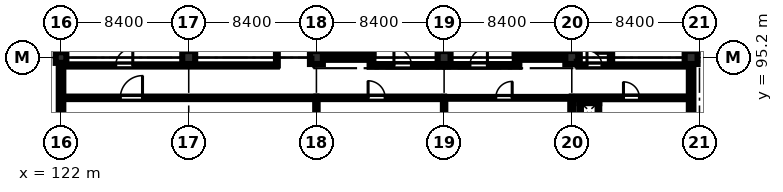
"""IFC4 building model, lengths in metres.
Left out: names, types, materials, properties, quantities, classifications, styles, units other than length and angle.
Written with IfcOpenShell. Run it as: python <this file> out.ifc"""

import sys

from ifc_helpers import new_model, si_unit, direction, frame, frame_2d, origin, origin_2d, place, context, subcontext, project, spatial, rectangle, extrude, element, fill, save


model = new_model("IFC4")
c1 = context("Model", 3, precision=1e-05, world=origin(), true_north=direction((0.0, 1.0)))
c2 = subcontext(c1, "Body", "Model", "MODEL_VIEW")
j1 = project(units=[si_unit("LENGTHUNIT", "METRE"), si_unit("PLANEANGLEUNIT", "RADIAN")], contexts=[c1])
p1 = place(None, origin())
s1 = spatial("IfcSite", under=j1, at=p1, CompositionType="ELEMENT")
p2 = place(p1, origin())
s2 = spatial("IfcBuilding", under=s1, at=p2, CompositionType="ELEMENT")
p3 = place(p2, frame((0.0, 0.0, 23.4)))
s3 = spatial("IfcBuildingStorey", under=s2, at=p3, CompositionType="ELEMENT", Elevation=23.4)
p4 = place(p3, frame((122.0, 95.2, 0.0), z_axis=(0.0, 0.0, 1.0), x_axis=(1.0, 0.0, 0.0)))
e1 = element("IfcColumn", 1, at=p4, inside=s3, PredefinedType="COLUMN", context=c2, shape_type="SweptSolid", body=[
    extrude(rectangle(XDim=0.7, YDim=0.7, at=origin_2d()), origin(), (0.0, 0.0, 1.0), 4.0),
])
for number, where, z_axis, x_axis in (
    (2, (130.4, 95.2, 0.0), (0.0, 0.0, 1.0), (1.0, 0.0, 0.0)),
    (3, (138.8, 95.2, 0.0), (0.0, 0.0, 1.0), (1.0, 0.0, 0.0)),
    (4, (147.2, 95.2, 0.0), (0.0, 0.0, 1.0), (1.0, 0.0, 0.0)),
    (5, (155.6, 95.2, 0.0), (0.0, 0.0, 1.0), (1.0, 0.0, 0.0)),
    (6, (163.45, 95.2, 0.0), (0.0, 0.0, 1.0), (1.0, 0.0, 0.0)),
):
    element("IfcColumn", number, at=place(p3, frame(where, z_axis=z_axis, x_axis=x_axis)), inside=s3, PredefinedType="COLUMN", context=c2, shape_type="SweptSolid", body=[
        extrude(rectangle(XDim=0.85, YDim=0.85, at=origin_2d()), origin(), (0.0, 0.0, 1.0), 4.0),
    ])
p5 = place(p3, frame((138.65, 95.25, 0.0), z_axis=(0.0, 0.0, 1.0), x_axis=(1.0, 0.0, 0.0)))
e7 = element("IfcWall", 7, at=p5, inside=s3, PredefinedType="SHEAR", context=c2, shape_type="SweptSolid", body=[
    extrude(rectangle(XDim=3.9, YDim=0.4, at=frame_2d((1.95, 0.0))), origin(), (0.0, 0.0, 1.0), 4.0),
])
p6 = place(p3, frame((138.85, 95.45, 0.0), z_axis=(0.0, 0.0, 1.0), x_axis=(0.0, 1.0, 0.0)))
e8 = element("IfcWall", 8, at=p6, inside=s3, PredefinedType="SHEAR", context=c2, shape_type="SweptSolid", body=[
    extrude(rectangle(XDim=7.9, YDim=0.4, at=frame_2d((3.95, 0.0))), origin(), (0.0, 0.0, 1.0), 4.0),
])
p7 = place(p3, frame((142.35, 95.45, 0.0), z_axis=(0.0, 0.0, 1.0), x_axis=(0.0, 1.0, 0.0)))
e9 = element("IfcWall", 9, at=p7, inside=s3, PredefinedType="SHEAR", context=c2, shape_type="SweptSolid", body=[
    extrude(rectangle(XDim=7.9, YDim=0.4, at=frame_2d((3.95, 0.0))), origin(), (0.0, 0.0, 1.0), 4.0),
])
p8 = place(p7, frame((0.22, 0.0, 0.0)))
e10 = element("IfcOpeningElement", 10, at=p8, cuts=e9, PredefinedType="OPENING", context=c2, shape_type="SweptSolid", body=[
    extrude(rectangle(XDim=1.15, YDim=2.15, at=frame_2d((0.575, 1.075))), frame((0.0, 0.21, 0.0), z_axis=(0.0, -1.0, 0.0), x_axis=(1.0, 0.0, 0.0)), (0.0, 0.0, 1.0), 0.42),
])
p9 = place(p3, frame((151.85, 95.25, 0.0), z_axis=(0.0, 0.0, 1.0), x_axis=(1.0, 0.0, 0.0)))
e11 = element("IfcWall", 11, at=p9, inside=s3, PredefinedType="SHEAR", context=c2, shape_type="SweptSolid", body=[
    extrude(rectangle(XDim=3.9, YDim=0.4, at=frame_2d((1.95, 0.0))), origin(), (0.0, 0.0, 1.0), 4.0),
])
p10 = place(p3, frame((152.05, 95.45, 0.0), z_axis=(0.0, 0.0, 1.0), x_axis=(0.0, 1.0, 0.0)))
e12 = element("IfcWall", 12, at=p10, inside=s3, PredefinedType="SHEAR", context=c2, shape_type="SweptSolid", body=[
    extrude(rectangle(XDim=7.9, YDim=0.4, at=frame_2d((3.95, 0.0))), origin(), (0.0, 0.0, 1.0), 4.0),
])
p11 = place(p10, frame((0.35, 0.0, 0.0)))
e13 = element("IfcOpeningElement", 13, at=p11, cuts=e12, PredefinedType="OPENING", context=c2, shape_type="SweptSolid", body=[
    extrude(rectangle(XDim=1.15, YDim=2.15, at=frame_2d((0.575, 1.075))), frame((0.0, 0.21, 0.0), z_axis=(0.0, -1.0, 0.0), x_axis=(1.0, 0.0, 0.0)), (0.0, 0.0, 1.0), 0.42),
])
p12 = place(p3, frame((155.55, 95.45, 0.0), z_axis=(0.0, 0.0, 1.0), x_axis=(0.0, 1.0, 0.0)))
e14 = element("IfcWall", 14, at=p12, inside=s3, PredefinedType="SHEAR", context=c2, shape_type="SweptSolid", body=[
    extrude(rectangle(XDim=7.9, YDim=0.4, at=frame_2d((3.95, 0.0))), origin(), (0.0, 0.0, 1.0), 4.0),
])
p13 = place(p3, frame((163.45, 94.775, 0.0), z_axis=(0.0, 0.0, 1.0), x_axis=(0.0, -1.0, 0.0)))
e15 = element("IfcWall", 15, at=p13, inside=s3, PredefinedType="STANDARD", context=c2, shape_type="SweptSolid", body=[
    extrude(rectangle(XDim=7.55, YDim=0.3, at=frame_2d((3.775, 0.0))), origin(), (0.0, 0.0, 1.0), 3.3),
])
p14 = place(p13, frame((4.2, 0.0, 1.1)))
e16 = element("IfcOpeningElement", 16, at=p14, cuts=e15, PredefinedType="OPENING", context=c2, shape_type="SweptSolid", body=[
    extrude(rectangle(XDim=1.55, YDim=1.75, at=frame_2d((0.775, 0.875))), frame((0.0, 0.16, 0.0), z_axis=(0.0, -1.0, 0.0), x_axis=(1.0, 0.0, 0.0)), (0.0, 0.0, 1.0), 0.32),
])
p15 = place(p3, frame((122.0, 87.15, 0.0), z_axis=(0.0, 0.0, 1.0), x_axis=(0.0, 1.0, 0.0)))
e17 = element("IfcWall", 17, at=p15, inside=s3, PredefinedType="STANDARD", context=c2, shape_type="SweptSolid", body=[
    extrude(rectangle(XDim=7.7, YDim=0.3, at=frame_2d((3.85, 0.0))), origin(), (0.0, 0.0, 1.0), 3.3),
])
p16 = place(p15, frame((2.4, 0.0, 0.95)))
e18 = element("IfcOpeningElement", 18, at=p16, cuts=e17, PredefinedType="OPENING", context=c2, shape_type="SweptSolid", body=[
    extrude(rectangle(XDim=1.5, YDim=1.8, at=frame_2d((0.75, 0.9))), frame((0.0, 0.16, 0.0), z_axis=(0.0, -1.0, 0.0), x_axis=(1.0, 0.0, 0.0)), (0.0, 0.0, 1.0), 0.32),
])
p17 = place(p3, frame((122.0, 95.55, 0.0), z_axis=(0.0, 0.0, 1.0), x_axis=(0.0, 1.0, 0.0)))
e19 = element("IfcWall", 19, at=p17, inside=s3, PredefinedType="STANDARD", context=c2, shape_type="SweptSolid", body=[
    extrude(rectangle(XDim=7.7, YDim=0.3, at=frame_2d((3.85, 0.0))), origin(), (0.0, 0.0, 1.0), 3.3),
])
p18 = place(p17, frame((2.4, 0.0, 1.0)))
e20 = element("IfcOpeningElement", 20, at=p18, cuts=e19, PredefinedType="OPENING", context=c2, shape_type="SweptSolid", body=[
    extrude(rectangle(XDim=1.8, YDim=1.8, at=frame_2d((0.9, 0.9))), frame((0.0, 0.16, 0.0), z_axis=(0.0, -1.0, 0.0), x_axis=(1.0, 0.0, 0.0)), (0.0, 0.0, 1.0), 0.32),
])
p19 = place(p3, frame((142.3, 94.68, 0.0), z_axis=(0.0, 0.0, 1.0), x_axis=(1.0, 0.0, 0.0)))
e21 = element("IfcWall", 21, at=p19, inside=s3, PredefinedType="STANDARD", context=c2, shape_type="SweptSolid", body=[
    extrude(rectangle(XDim=4.8, YDim=0.18, at=frame_2d((2.4, 0.0))), origin(), (0.0, 0.0, 1.0), 4.0),
])
p20 = place(p19, frame((1.6, 0.0, 0.0)))
e22 = element("IfcOpeningElement", 22, at=p20, cuts=e21, PredefinedType="OPENING", context=c2, shape_type="SweptSolid", body=[
    extrude(rectangle(XDim=1.15, YDim=2.15, at=frame_2d((0.575, 1.075))), frame((0.0, 0.1, 0.0), z_axis=(0.0, -1.0, 0.0), x_axis=(1.0, 0.0, 0.0)), (0.0, 0.0, 1.0), 0.2),
])
p21 = place(p3, frame((147.3, 94.68, 0.0), z_axis=(0.0, 0.0, 1.0), x_axis=(1.0, 0.0, 0.0)))
e23 = element("IfcWall", 23, at=p21, inside=s3, PredefinedType="STANDARD", context=c2, shape_type="SweptSolid", body=[
    extrude(rectangle(XDim=4.85, YDim=0.18, at=frame_2d((2.425, 0.0))), origin(), (0.0, 0.0, 1.0), 4.0),
])
p22 = place(p21, frame((1.6, 0.0, 0.0)))
e24 = element("IfcOpeningElement", 24, at=p22, cuts=e23, PredefinedType="OPENING", context=c2, shape_type="SweptSolid", body=[
    extrude(rectangle(XDim=1.15, YDim=2.15, at=frame_2d((0.575, 1.075))), frame((0.0, 0.1, 0.0), z_axis=(0.0, -1.0, 0.0), x_axis=(1.0, 0.0, 0.0)), (0.0, 0.0, 1.0), 0.2),
])
p23 = place(p3, frame((156.05, 94.68, 0.0), z_axis=(0.0, 0.0, 1.0), x_axis=(1.0, 0.0, 0.0)))
e25 = element("IfcWall", 25, at=p23, inside=s3, PredefinedType="PARTITIONING", context=c2, shape_type="SweptSolid", body=[
    extrude(rectangle(XDim=7.15, YDim=0.15, at=frame_2d((3.575, 0.0))), origin(), (0.0, 0.0, 1.0), 4.0),
])
p24 = place(p23, frame((0.55, 0.0, 0.0)))
e26 = element("IfcOpeningElement", 26, at=p24, cuts=e25, PredefinedType="OPENING", context=c2, shape_type="SweptSolid", body=[
    extrude(rectangle(XDim=0.98, YDim=2.12, at=frame_2d((0.49, 1.06))), frame((0.0, 0.085, 0.0), z_axis=(0.0, -1.0, 0.0), x_axis=(1.0, 0.0, 0.0)), (0.0, 0.0, 1.0), 0.17),
])
p25 = place(p3, frame((158.18, 94.68, 0.0), z_axis=(0.0, 0.0, 1.0), x_axis=(0.0, 1.0, 0.0)))
e27 = element("IfcWall", 27, at=p25, inside=s3, PredefinedType="PARTITIONING", context=c2, shape_type="SweptSolid", body=[
    extrude(rectangle(XDim=8.57, YDim=0.15, at=frame_2d((4.285, 0.0))), origin(), (0.0, 0.0, 1.0), 4.0),
])
p26 = place(p25, frame((0.8, 0.0, 0.0)))
e28 = element("IfcOpeningElement", 28, at=p26, cuts=e27, PredefinedType="OPENING", context=c2, shape_type="SweptSolid", body=[
    extrude(rectangle(XDim=1.0, YDim=2.12, at=frame_2d((0.5, 1.06))), frame((0.0, 0.085, 0.0), z_axis=(0.0, -1.0, 0.0), x_axis=(1.0, 0.0, 0.0)), (0.0, 0.0, 1.0), 0.17),
])
p27 = place(p25, frame((3.5, 0.0, 0.0)))
e29 = element("IfcOpeningElement", 29, at=p27, cuts=e27, PredefinedType="OPENING", context=c2, shape_type="SweptSolid", body=[
    extrude(rectangle(XDim=0.92, YDim=2.1, at=frame_2d((0.46, 1.05))), frame((0.0, 0.085, 0.0), z_axis=(0.0, -1.0, 0.0), x_axis=(1.0, 0.0, 0.0)), (0.0, 0.0, 1.0), 0.17),
])
p28 = place(p25, frame((6.4, 0.0, 0.0)))
e30 = element("IfcOpeningElement", 30, at=p28, cuts=e27, PredefinedType="OPENING", context=c2, shape_type="SweptSolid", body=[
    extrude(rectangle(XDim=0.92, YDim=2.1, at=frame_2d((0.46, 1.05))), frame((0.0, 0.085, 0.0), z_axis=(0.0, -1.0, 0.0), x_axis=(1.0, 0.0, 0.0)), (0.0, 0.0, 1.0), 0.17),
])
p29 = place(p3, frame((156.05, 94.68, 0.0), z_axis=(0.0, 0.0, 1.0), x_axis=(0.0, 1.0, 0.0)))
e31 = element("IfcWall", 31, at=p29, inside=s3, PredefinedType="PARTITIONING", context=c2, shape_type="SweptSolid", body=[
    extrude(rectangle(XDim=8.57, YDim=0.15, at=frame_2d((4.285, 0.0))), origin(), (0.0, 0.0, 1.0), 4.0),
])
p30 = place(p3, frame((136.2, 94.68, 0.0), z_axis=(0.0, 0.0, 1.0), x_axis=(0.0, 1.0, 0.0)))
e32 = element("IfcWall", 32, at=p30, inside=s3, PredefinedType="PARTITIONING", context=c2, shape_type="SweptSolid", body=[
    extrude(rectangle(XDim=9.07, YDim=0.12, at=frame_2d((4.535, 0.0))), origin(), (0.0, 0.0, 1.0), 4.0),
])
p31 = place(p3, frame((122.4, 94.68, 0.0), z_axis=(0.0, 0.0, 1.0), x_axis=(1.0, 0.0, 0.0)))
e33 = element("IfcWall", 33, at=p31, inside=s3, PredefinedType="PARTITIONING", context=c2, shape_type="SweptSolid", body=[
    extrude(rectangle(XDim=13.8, YDim=0.145, at=frame_2d((6.9, 0.0))), origin(), (0.0, 0.0, 1.0), 4.0),
])
p32 = place(p31, frame((3.2, 0.0, 0.0)))
e34 = element("IfcOpeningElement", 34, at=p32, cuts=e33, PredefinedType="OPENING", context=c2, shape_type="SweptSolid", body=[
    extrude(rectangle(XDim=1.12, YDim=2.18, at=frame_2d((0.56, 1.09))), frame((0.0, 0.083, 0.0), z_axis=(0.0, -1.0, 0.0), x_axis=(1.0, 0.0, 0.0)), (0.0, 0.0, 1.0), 0.165),
])
p33 = place(p3, frame((122.15, 92.55, 0.0), z_axis=(0.0, 0.0, 1.0), x_axis=(1.0, 0.0, 0.0)))
e35 = element("IfcWall", 35, at=p33, inside=s3, PredefinedType="PARTITIONING", context=c2, shape_type="SweptSolid", body=[
    extrude(rectangle(XDim=16.65, YDim=0.165, at=frame_2d((8.325, 0.0))), origin(), (0.0, 0.0, 1.0), 4.0),
])
p34 = place(p33, frame((3.75, 0.0, 0.0)))
e36 = element("IfcOpeningElement", 36, at=p34, cuts=e35, PredefinedType="OPENING", context=c2, shape_type="SweptSolid", body=[
    extrude(rectangle(XDim=1.46, YDim=2.22, at=frame_2d((0.73, 1.11))), frame((0.0, 0.093, 0.0), z_axis=(0.0, -1.0, 0.0), x_axis=(1.0, 0.0, 0.0)), (0.0, 0.0, 1.0), 0.185),
])
p35 = place(p3, frame((138.8, 92.55, 0.0), z_axis=(0.0, 0.0, 1.0), x_axis=(1.0, 0.0, 0.0)))
e37 = element("IfcWall", 37, at=p35, inside=s3, PredefinedType="PARTITIONING", context=c2, shape_type="SweptSolid", body=[
    extrude(rectangle(XDim=8.4, YDim=0.165, at=frame_2d((4.2, 0.0))), origin(), (0.0, 0.0, 1.0), 4.0),
])
p36 = place(p35, frame((3.4, 0.0, 0.0)))
e38 = element("IfcOpeningElement", 38, at=p36, cuts=e37, PredefinedType="OPENING", context=c2, shape_type="SweptSolid", body=[
    extrude(rectangle(XDim=1.12, YDim=2.18, at=frame_2d((0.56, 1.09))), frame((0.0, 0.093, 0.0), z_axis=(0.0, -1.0, 0.0), x_axis=(1.0, 0.0, 0.0)), (0.0, 0.0, 1.0), 0.185),
])
p37 = place(p3, frame((138.8, 78.55, 0.0), z_axis=(0.0, 0.0, 1.0), x_axis=(0.0, 1.0, 0.0)))
e39 = element("IfcWall", 39, at=p37, inside=s3, PredefinedType="PARTITIONING", context=c2, shape_type="SweptSolid", body=[
    extrude(rectangle(XDim=14.0, YDim=0.158, at=frame_2d((7.0, 0.0))), origin(), (0.0, 0.0, 1.0), 3.3),
])
p38 = place(p3, frame((147.2, 92.55, 0.0), z_axis=(0.0, 0.0, 1.0), x_axis=(1.0, 0.0, 0.0)))
e40 = element("IfcWall", 40, at=p38, inside=s3, PredefinedType="PARTITIONING", context=c2, shape_type="SweptSolid", body=[
    extrude(rectangle(XDim=8.4, YDim=0.12, at=frame_2d((4.2, 0.0))), origin(), (0.0, 0.0, 1.0), 4.0),
])
p39 = place(p38, frame((3.4, 0.0, 0.0)))
e41 = element("IfcOpeningElement", 41, at=p39, cuts=e40, PredefinedType="OPENING", context=c2, shape_type="SweptSolid", body=[
    extrude(rectangle(XDim=1.08, YDim=2.15, at=frame_2d((0.54, 1.075))), frame((0.0, 0.07, 0.0), z_axis=(0.0, -1.0, 0.0), x_axis=(1.0, 0.0, 0.0)), (0.0, 0.0, 1.0), 0.14),
])
p40 = place(p3, frame((147.2, 78.55, 0.0), z_axis=(0.0, 0.0, 1.0), x_axis=(0.0, 1.0, 0.0)))
e42 = element("IfcWall", 42, at=p40, inside=s3, PredefinedType="PARTITIONING", context=c2, shape_type="SweptSolid", body=[
    extrude(rectangle(XDim=14.0, YDim=0.158, at=frame_2d((7.0, 0.0))), origin(), (0.0, 0.0, 1.0), 3.3),
])
p41 = place(p3, frame((155.6, 92.55, 0.0), z_axis=(0.0, 0.0, 1.0), x_axis=(1.0, 0.0, 0.0)))
e43 = element("IfcWall", 43, at=p41, inside=s3, PredefinedType="STANDARD", context=c2, shape_type="SweptSolid", body=[
    extrude(rectangle(XDim=7.75, YDim=0.18, at=frame_2d((3.875, 0.0))), origin(), (0.0, 0.0, 1.0), 4.0),
])
p42 = place(p41, frame((3.4, 0.0, 0.0)))
e44 = element("IfcOpeningElement", 44, at=p42, cuts=e43, PredefinedType="OPENING", context=c2, shape_type="SweptSolid", body=[
    extrude(rectangle(XDim=1.05, YDim=2.15, at=frame_2d((0.525, 1.075))), frame((0.0, 0.1, 0.0), z_axis=(0.0, -1.0, 0.0), x_axis=(1.0, 0.0, 0.0)), (0.0, 0.0, 1.0), 0.2),
])
p43 = place(p3, frame((155.6, 78.55, 0.0), z_axis=(0.0, 0.0, 1.0), x_axis=(0.0, 1.0, 0.0)))
e45 = element("IfcWall", 45, at=p43, inside=s3, PredefinedType="SOLIDWALL", context=c2, shape_type="SweptSolid", body=[
    extrude(rectangle(XDim=14.0, YDim=0.2, at=frame_2d((7.0, 0.0))), origin(), (0.0, 0.0, 1.0), 3.3),
])
p44 = place(p3, frame((156.095, 92.252, 0.0), z_axis=(0.0, 0.0, 1.0), x_axis=(1.0, 0.0, 0.0)))
e46 = element("IfcWall", 46, at=p44, inside=s3, PredefinedType="PARTITIONING", context=c2, shape_type="SweptSolid", body=[
    extrude(rectangle(XDim=1.31, YDim=0.105, at=frame_2d((0.655, 0.0))), origin(), (0.0, 0.0, 1.0), 4.0),
])
for number, where, z_axis, x_axis in (
    (47, (156.147, 91.2, 0.0), (0.0, 0.0, 1.0), (0.0, 1.0, 0.0)),
    (48, (157.353, 91.2, 0.0), (0.0, 0.0, 1.0), (0.0, 1.0, 0.0)),
):
    element("IfcWall", number, at=place(p3, frame(where, z_axis=z_axis, x_axis=x_axis)), inside=s3, PredefinedType="PARTITIONING", context=c2, shape_type="SweptSolid", body=[
        extrude(rectangle(XDim=1.0, YDim=0.105, at=frame_2d((0.5, 0.0))), origin(), (0.0, 0.0, 1.0), 4.0),
    ])
p45 = place(p20, origin())
e49 = element("IfcDoor", 49, at=p45, inside=s3, OperationType="SINGLE_SWING_LEFT", PredefinedType="DOOR", context=c2, shape_type="SweptSolid", body=[
    extrude(rectangle(XDim=1.15, YDim=2.15, at=frame_2d((0.575, 1.075))), frame((0.0, 0.025, 0.0), z_axis=(0.0, -1.0, 0.0), x_axis=(1.0, 0.0, 0.0)), (0.0, 0.0, 1.0), 0.05),
])
fill(e22, e49)
p46 = place(p22, origin())
e50 = element("IfcDoor", 50, at=p46, inside=s3, OperationType="SINGLE_SWING_RIGHT", PredefinedType="DOOR", context=c2, shape_type="SweptSolid", body=[
    extrude(rectangle(XDim=1.15, YDim=2.15, at=frame_2d((0.575, 1.075))), frame((0.0, 0.025, 0.0), z_axis=(0.0, -1.0, 0.0), x_axis=(1.0, 0.0, 0.0)), (0.0, 0.0, 1.0), 0.05),
])
fill(e24, e50)
p47 = place(p24, origin())
e51 = element("IfcDoor", 51, at=p47, inside=s3, OperationType="SINGLE_SWING_LEFT", PredefinedType="DOOR", context=c2, shape_type="SweptSolid", body=[
    extrude(rectangle(XDim=0.98, YDim=2.12, at=frame_2d((0.49, 1.06))), frame((0.0, 0.025, 0.0), z_axis=(0.0, -1.0, 0.0), x_axis=(1.0, 0.0, 0.0)), (0.0, 0.0, 1.0), 0.05),
])
fill(e26, e51)
p48 = place(p26, origin())
e52 = element("IfcDoor", 52, at=p48, inside=s3, OperationType="SINGLE_SWING_LEFT", PredefinedType="DOOR", context=c2, shape_type="SweptSolid", body=[
    extrude(rectangle(XDim=1.0, YDim=2.12, at=frame_2d((0.5, 1.06))), frame((0.0, 0.025, 0.0), z_axis=(0.0, -1.0, 0.0), x_axis=(1.0, 0.0, 0.0)), (0.0, 0.0, 1.0), 0.05),
])
fill(e28, e52)
p49 = place(p32, origin())
e53 = element("IfcDoor", 53, at=p49, inside=s3, OperationType="SINGLE_SWING_RIGHT", PredefinedType="DOOR", context=c2, shape_type="SweptSolid", body=[
    extrude(rectangle(XDim=1.12, YDim=2.18, at=frame_2d((0.56, 1.09))), frame((0.0, 0.025, 0.0), z_axis=(0.0, -1.0, 0.0), x_axis=(1.0, 0.0, 0.0)), (0.0, 0.0, 1.0), 0.05),
])
fill(e34, e53)
p50 = place(p34, origin())
e54 = element("IfcDoor", 54, at=p50, inside=s3, OperationType="SINGLE_SWING_RIGHT", PredefinedType="DOOR", context=c2, shape_type="SweptSolid", body=[
    extrude(rectangle(XDim=1.46, YDim=2.22, at=frame_2d((0.73, 1.11))), frame((0.0, 0.025, 0.0), z_axis=(0.0, -1.0, 0.0), x_axis=(1.0, 0.0, 0.0)), (0.0, 0.0, 1.0), 0.05),
])
fill(e36, e54)
p51 = place(p36, origin())
e55 = element("IfcDoor", 55, at=p51, inside=s3, OperationType="SINGLE_SWING_LEFT", PredefinedType="DOOR", context=c2, shape_type="SweptSolid", body=[
    extrude(rectangle(XDim=1.12, YDim=2.18, at=frame_2d((0.56, 1.09))), frame((0.0, 0.025, 0.0), z_axis=(0.0, -1.0, 0.0), x_axis=(1.0, 0.0, 0.0)), (0.0, 0.0, 1.0), 0.05),
])
fill(e38, e55)
p52 = place(p39, origin())
e56 = element("IfcDoor", 56, at=p52, inside=s3, OperationType="SINGLE_SWING_RIGHT", PredefinedType="DOOR", context=c2, shape_type="SweptSolid", body=[
    extrude(rectangle(XDim=1.08, YDim=2.15, at=frame_2d((0.54, 1.075))), frame((0.0, 0.025, 0.0), z_axis=(0.0, -1.0, 0.0), x_axis=(1.0, 0.0, 0.0)), (0.0, 0.0, 1.0), 0.05),
])
fill(e41, e56)
p53 = place(p42, origin())
e57 = element("IfcDoor", 57, at=p53, inside=s3, OperationType="SINGLE_SWING_LEFT", PredefinedType="DOOR", context=c2, shape_type="SweptSolid", body=[
    extrude(rectangle(XDim=1.05, YDim=2.15, at=frame_2d((0.525, 1.075))), frame((0.0, 0.025, 0.0), z_axis=(0.0, -1.0, 0.0), x_axis=(1.0, 0.0, 0.0)), (0.0, 0.0, 1.0), 0.05),
])
fill(e44, e57)
save(model, sys.argv[1])
